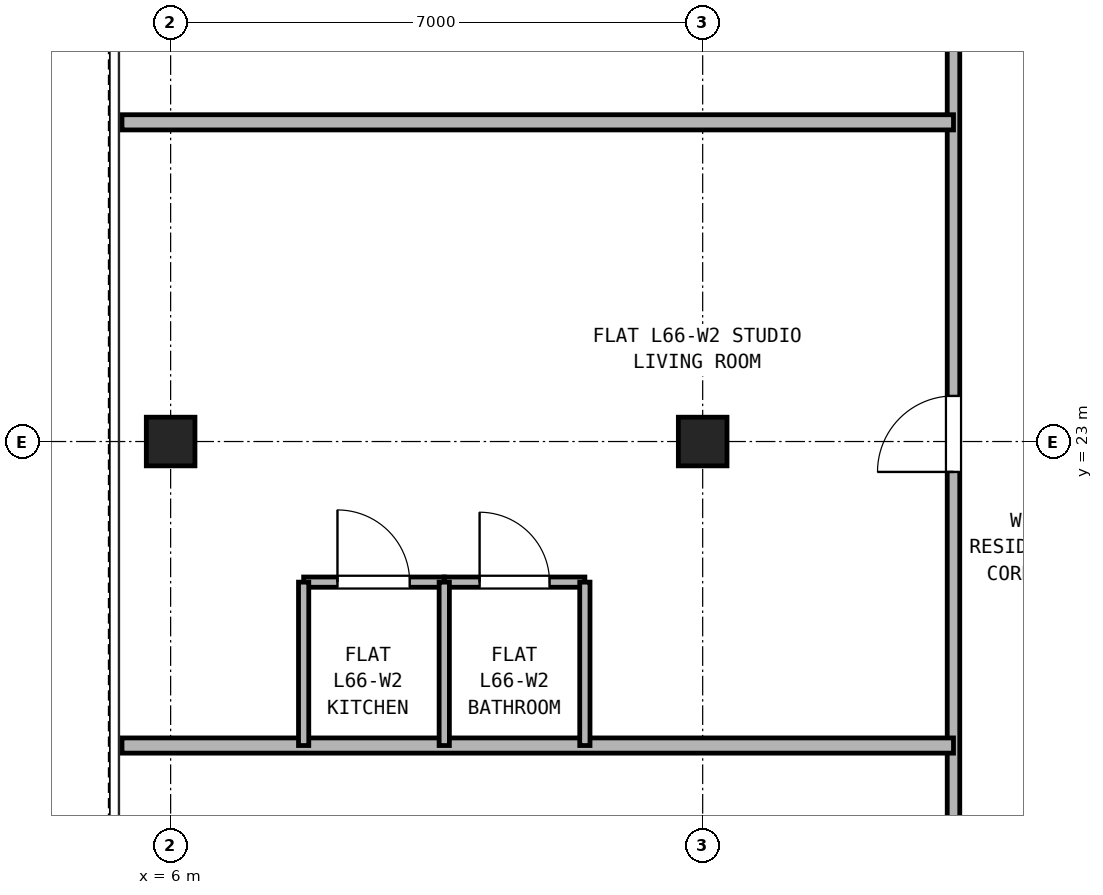
"""IFC4 building model, lengths in metres.
Left out: names, types, materials, properties, quantities, classifications, styles, units other than length and angle.
Written with IfcOpenShell. Run it as: python <this file> out.ifc"""

import sys

from ifc_helpers import new_model, si_unit, direction, frame, frame_2d, origin, origin_2d, place, context, subcontext, project, spatial, rectangle, hollow_rectangle, extrude, source, transform, mapped, element, fill, save


model = new_model("IFC4")
c1 = context("Model", 3, precision=1e-05, world=origin(), true_north=direction((0.0, 1.0)))
c2 = subcontext(c1, "Body", "Model", "MODEL_VIEW")
j1 = project(units=[si_unit("LENGTHUNIT", "METRE"), si_unit("PLANEANGLEUNIT", "RADIAN")], contexts=[c1])
p1 = place(None, origin())
s1 = spatial("IfcSite", under=j1, at=p1, CompositionType="ELEMENT")
p2 = place(p1, origin())
s2 = spatial("IfcBuilding", under=s1, at=p2, CompositionType="ELEMENT")
p3 = place(p2, frame((0.0, 0.0, 232.9)))
s3 = spatial("IfcBuildingStorey", under=s2, at=p3, CompositionType="ELEMENT", Elevation=232.9)
m1 = source(origin(), c2, "Body", "SweptSolid", [
    extrude(hollow_rectangle(XDim=0.64, YDim=0.64, WallThickness=0.035, at=origin_2d()), origin(), (0.0, 0.0, 1.0), 2.98),
])
for number, where, z_axis, x_axis in (
    (1, (6.0, 23.0, 0.0), (0.0, 0.0, 1.0), (1.0, 0.0, 0.0)),
    (2, (13.0, 23.0, 0.0), (0.0, 0.0, 1.0), (1.0, 0.0, 0.0)),
):
    element("IfcColumn", number, at=place(p3, frame(where, z_axis=z_axis, x_axis=x_axis)), inside=s3, PredefinedType="COLUMN", context=c2, shape_type="MappedRepresentation", body=[
        mapped(m1, transform((0.0, 0.0, 0.0), x_axis=(1.0, 0.0, 0.0), y_axis=(0.0, 1.0, 0.0), z_axis=(0.0, 0.0, 1.0), scale=1.0)),
    ])
p4 = place(p3, frame((16.3, 11.45, 0.0), z_axis=(0.0, 0.0, 1.0), x_axis=(0.0, 1.0, 0.0)))
e3 = element("IfcWall", 3, at=p4, inside=s3, PredefinedType="PARTITIONING", context=c2, shape_type="SweptSolid", body=[
    extrude(rectangle(XDim=23.69, YDim=0.165, at=frame_2d((11.845, 0.0))), origin(), (0.0, 0.0, 1.0), 2.98),
])
p5 = place(p4, frame((3.275, 0.0, 0.0)))
e4 = element("IfcOpeningElement", 4, at=p5, cuts=e3, PredefinedType="OPENING", context=c2, shape_type="SweptSolid", body=[
    extrude(rectangle(XDim=1.0, YDim=2.15, at=frame_2d((0.5, 1.075))), frame((0.0, 0.093, 0.0), z_axis=(0.0, -1.0, 0.0), x_axis=(1.0, 0.0, 0.0)), (0.0, 0.0, 1.0), 0.185),
])
p6 = place(p4, frame((11.15, 0.0, 0.0)))
e5 = element("IfcOpeningElement", 5, at=p6, cuts=e3, PredefinedType="OPENING", context=c2, shape_type="SweptSolid", body=[
    extrude(rectangle(XDim=1.0, YDim=2.15, at=frame_2d((0.5, 1.075))), frame((0.0, 0.093, 0.0), z_axis=(0.0, -1.0, 0.0), x_axis=(1.0, 0.0, 0.0)), (0.0, 0.0, 1.0), 0.185),
])
p7 = place(p4, frame((16.925, 0.0, 0.0)))
e6 = element("IfcOpeningElement", 6, at=p7, cuts=e3, PredefinedType="OPENING", context=c2, shape_type="SweptSolid", body=[
    extrude(rectangle(XDim=1.0, YDim=2.15, at=frame_2d((0.5, 1.075))), frame((0.0, 0.093, 0.0), z_axis=(0.0, -1.0, 0.0), x_axis=(1.0, 0.0, 0.0)), (0.0, 0.0, 1.0), 0.185),
])
p8 = place(p3, frame((5.36, 19.0, 0.0), z_axis=(0.0, 0.0, 1.0), x_axis=(1.0, 0.0, 0.0)))
e7 = element("IfcWall", 7, at=p8, inside=s3, PredefinedType="PARTITIONING", context=c2, shape_type="SweptSolid", body=[
    extrude(rectangle(XDim=10.94, YDim=0.2, at=frame_2d((5.47, 0.0))), origin(), (0.0, 0.0, 1.0), 2.98),
])
p9 = place(p3, frame((7.75, 21.15, 0.0), z_axis=(0.0, 0.0, 1.0), x_axis=(1.0, 0.0, 0.0)))
e8 = element("IfcWall", 8, at=p9, inside=s3, PredefinedType="PARTITIONING", context=c2, shape_type="SweptSolid", body=[
    extrude(rectangle(XDim=1.85, YDim=0.135, at=frame_2d((0.925, 0.0))), origin(), (0.0, 0.0, 1.0), 2.98),
])
p10 = place(p9, frame((0.445, 0.0, 0.0)))
e9 = element("IfcOpeningElement", 9, at=p10, cuts=e8, PredefinedType="OPENING", context=c2, shape_type="SweptSolid", body=[
    extrude(rectangle(XDim=0.95, YDim=2.15, at=frame_2d((0.475, 1.075))), frame((0.0, 0.077, 0.0), z_axis=(0.0, -1.0, 0.0), x_axis=(1.0, 0.0, 0.0)), (0.0, 0.0, 1.0), 0.155),
])
p11 = place(p3, frame((9.6, 21.15, 0.0), z_axis=(0.0, 0.0, 1.0), x_axis=(1.0, 0.0, 0.0)))
e10 = element("IfcWall", 10, at=p11, inside=s3, PredefinedType="PARTITIONING", context=c2, shape_type="SweptSolid", body=[
    extrude(rectangle(XDim=1.85, YDim=0.135, at=frame_2d((0.925, 0.0))), origin(), (0.0, 0.0, 1.0), 2.98),
])
p12 = place(p11, frame((0.465, 0.0, 0.0)))
e11 = element("IfcOpeningElement", 11, at=p12, cuts=e10, PredefinedType="OPENING", context=c2, shape_type="SweptSolid", body=[
    extrude(rectangle(XDim=0.92, YDim=2.1, at=frame_2d((0.46, 1.05))), frame((0.0, 0.077, 0.0), z_axis=(0.0, -1.0, 0.0), x_axis=(1.0, 0.0, 0.0)), (0.0, 0.0, 1.0), 0.155),
])
for number, where, z_axis, x_axis in (
    (12, (7.75, 19.0, 0.0), (0.0, 0.0, 1.0), (0.0, 1.0, 0.0)),
    (13, (9.6, 19.0, 0.0), (0.0, 0.0, 1.0), (0.0, 1.0, 0.0)),
    (14, (11.45, 19.0, 0.0), (0.0, 0.0, 1.0), (0.0, 1.0, 0.0)),
):
    element("IfcWall", number, at=place(p3, frame(where, z_axis=z_axis, x_axis=x_axis)), inside=s3, PredefinedType="PARTITIONING", context=c2, shape_type="SweptSolid", body=[
        extrude(rectangle(XDim=2.15, YDim=0.135, at=frame_2d((1.075, 0.0))), origin(), (0.0, 0.0, 1.0), 2.98),
    ])
p13 = place(p3, frame((5.36, 27.2, 0.0), z_axis=(0.0, 0.0, 1.0), x_axis=(1.0, 0.0, 0.0)))
e15 = element("IfcWall", 15, at=p13, inside=s3, PredefinedType="PARTITIONING", context=c2, shape_type="SweptSolid", body=[
    extrude(rectangle(XDim=10.94, YDim=0.2, at=frame_2d((5.47, 0.0))), origin(), (0.0, 0.0, 1.0), 2.98),
])
p14 = place(p10, origin())
e16 = element("IfcDoor", 16, at=p14, inside=s3, OperationType="SINGLE_SWING_LEFT", PredefinedType="DOOR", context=c2, shape_type="SweptSolid", body=[
    extrude(rectangle(XDim=0.95, YDim=2.15, at=frame_2d((0.475, 1.075))), frame((0.0, 0.025, 0.0), z_axis=(0.0, -1.0, 0.0), x_axis=(1.0, 0.0, 0.0)), (0.0, 0.0, 1.0), 0.05),
])
fill(e9, e16)
p15 = place(p12, origin())
e17 = element("IfcDoor", 17, at=p15, inside=s3, OperationType="SINGLE_SWING_LEFT", PredefinedType="DOOR", context=c2, shape_type="SweptSolid", body=[
    extrude(rectangle(XDim=0.92, YDim=2.1, at=frame_2d((0.46, 1.05))), frame((0.0, 0.025, 0.0), z_axis=(0.0, -1.0, 0.0), x_axis=(1.0, 0.0, 0.0)), (0.0, 0.0, 1.0), 0.05),
])
fill(e11, e17)
p16 = place(p6, origin())
e18 = element("IfcDoor", 18, at=p16, inside=s3, OperationType="SINGLE_SWING_LEFT", PredefinedType="DOOR", context=c2, shape_type="SweptSolid", body=[
    extrude(rectangle(XDim=1.0, YDim=2.15, at=frame_2d((0.5, 1.075))), frame((0.0, 0.025, 0.0), z_axis=(0.0, -1.0, 0.0), x_axis=(1.0, 0.0, 0.0)), (0.0, 0.0, 1.0), 0.05),
])
fill(e5, e18)
save(model, sys.argv[1])
